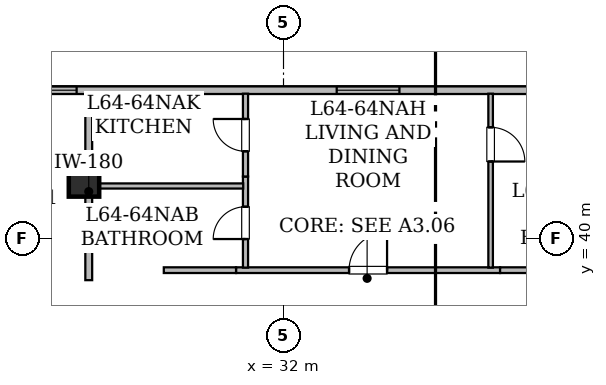
"""IFC4 building model, lengths in metres.
Left out: names, types, materials, properties, quantities, classifications, styles, units other than length and angle.
Written with IfcOpenShell. Run it as: python <this file> out.ifc"""

import sys

from ifc_helpers import new_model, si_unit, direction, frame, frame_2d, origin, origin_2d, place, context, subcontext, project, spatial, rectangle, hollow_rectangle, extrude, element, fill, save


model = new_model("IFC4")
c1 = context("Model", 3, precision=1e-05, world=origin(), true_north=direction((0.0, 1.0)))
c2 = subcontext(c1, "Body", "Model", "MODEL_VIEW")
j1 = project(units=[si_unit("LENGTHUNIT", "METRE"), si_unit("PLANEANGLEUNIT", "RADIAN")], contexts=[c1])
p1 = place(None, origin())
s1 = spatial("IfcSite", under=j1, at=p1, CompositionType="ELEMENT")
p2 = place(p1, origin())
s2 = spatial("IfcBuilding", under=s1, at=p2, CompositionType="ELEMENT")
p3 = place(p2, frame((0.0, 0.0, 250.05)))
s3 = spatial("IfcBuildingStorey", under=s2, at=p3, CompositionType="ELEMENT", Elevation=250.05)
p4 = place(p3, frame((26.75, 41.5, 0.0), z_axis=(0.0, 0.0, 1.0), x_axis=(1.0, 0.0, 0.0)))
e1 = element("IfcColumn", 1, at=p4, inside=s3, PredefinedType="COLUMN", context=c2, shape_type="SweptSolid", body=[
    extrude(hollow_rectangle(XDim=0.8, YDim=0.8, WallThickness=0.04, at=origin_2d()), origin(), (0.0, 0.0, 1.0), 3.65),
])
p5 = place(p3, frame((24.302, 43.9, 0.0), z_axis=(0.0, 0.0, 1.0), x_axis=(1.0, 0.0, 0.0)))
e2 = element("IfcWall", 2, at=p5, inside=s3, PredefinedType="STANDARD", context=c2, shape_type="SweptSolid", body=[
    extrude(rectangle(XDim=41.457, YDim=0.2, at=frame_2d((20.729, 0.0))), origin(), (0.0, 0.0, 1.0), 3.43),
])
p6 = place(p5, frame((0.604, 0.0, 0.85)))
e3 = element("IfcOpeningElement", 3, at=p6, cuts=e2, PredefinedType="OPENING", context=c2, shape_type="SweptSolid", body=[
    extrude(rectangle(XDim=1.65, YDim=1.55, at=frame_2d((0.825, 0.775))), frame((0.0, 0.11, 0.0), z_axis=(0.0, -1.0, 0.0), x_axis=(1.0, 0.0, 0.0)), (0.0, 0.0, 1.0), 0.22),
])
p7 = place(p5, frame((9.098, 0.0, 0.85)))
e4 = element("IfcOpeningElement", 4, at=p7, cuts=e2, PredefinedType="OPENING", context=c2, shape_type="SweptSolid", body=[
    extrude(rectangle(XDim=1.65, YDim=1.55, at=frame_2d((0.825, 0.775))), frame((0.0, 0.11, 0.0), z_axis=(0.0, -1.0, 0.0), x_axis=(1.0, 0.0, 0.0)), (0.0, 0.0, 1.0), 0.22),
])
p8 = place(p5, frame((14.405, 0.0, 0.85)))
e5 = element("IfcOpeningElement", 5, at=p8, cuts=e2, PredefinedType="OPENING", context=c2, shape_type="SweptSolid", body=[
    extrude(rectangle(XDim=1.65, YDim=1.55, at=frame_2d((0.825, 0.775))), frame((0.0, 0.11, 0.0), z_axis=(0.0, -1.0, 0.0), x_axis=(1.0, 0.0, 0.0)), (0.0, 0.0, 1.0), 0.22),
])
p9 = place(p5, frame((22.898, 0.0, 0.8)))
e6 = element("IfcOpeningElement", 6, at=p9, cuts=e2, PredefinedType="OPENING", context=c2, shape_type="SweptSolid", body=[
    extrude(rectangle(XDim=1.2, YDim=1.5, at=frame_2d((0.6, 0.75))), frame((0.0, 0.11, 0.0), z_axis=(0.0, -1.0, 0.0), x_axis=(1.0, 0.0, 0.0)), (0.0, 0.0, 1.0), 0.22),
])
p10 = place(p5, frame((19.188, 0.0, 0.85)))
e7 = element("IfcOpeningElement", 7, at=p10, cuts=e2, PredefinedType="OPENING", context=c2, shape_type="SweptSolid", body=[
    extrude(rectangle(XDim=1.65, YDim=1.55, at=frame_2d((0.825, 0.775))), frame((0.0, 0.11, 0.0), z_axis=(0.0, -1.0, 0.0), x_axis=(1.0, 0.0, 0.0)), (0.0, 0.0, 1.0), 0.22),
])
p11 = place(p5, frame((26.158, 0.0, 0.85)))
e8 = element("IfcOpeningElement", 8, at=p11, cuts=e2, PredefinedType="OPENING", context=c2, shape_type="SweptSolid", body=[
    extrude(rectangle(XDim=1.65, YDim=1.55, at=frame_2d((0.825, 0.775))), frame((0.0, 0.11, 0.0), z_axis=(0.0, -1.0, 0.0), x_axis=(1.0, 0.0, 0.0)), (0.0, 0.0, 1.0), 0.22),
])
p12 = place(p5, frame((32.408, 0.0, 0.85)))
e9 = element("IfcOpeningElement", 9, at=p12, cuts=e2, PredefinedType="OPENING", context=c2, shape_type="SweptSolid", body=[
    extrude(rectangle(XDim=1.65, YDim=1.55, at=frame_2d((0.825, 0.775))), frame((0.0, 0.11, 0.0), z_axis=(0.0, -1.0, 0.0), x_axis=(1.0, 0.0, 0.0)), (0.0, 0.0, 1.0), 0.22),
])
p13 = place(p3, frame((30.751, 39.165, 0.0), z_axis=(0.0, 0.0, 1.0), x_axis=(1.0, 0.0, 0.0)))
e10 = element("IfcWall", 10, at=p13, inside=s3, PredefinedType="STANDARD", context=c2, shape_type="SweptSolid", body=[
    extrude(rectangle(XDim=6.948, YDim=0.15, at=frame_2d((3.474, 0.0))), origin(), (0.0, 0.0, 1.0), 3.43),
])
p14 = place(p13, frame((2.974, 0.0, 0.0)))
e11 = element("IfcOpeningElement", 11, at=p14, cuts=e10, PredefinedType="OPENING", context=c2, shape_type="SweptSolid", body=[
    extrude(rectangle(XDim=1.0, YDim=2.15, at=frame_2d((0.5, 1.075))), frame((0.0, 0.085, 0.0), z_axis=(0.0, -1.0, 0.0), x_axis=(1.0, 0.0, 0.0)), (0.0, 0.0, 1.0), 0.17),
])
p15 = place(p3, frame((28.85, 39.165, 0.0), z_axis=(0.0, 0.0, 1.0), x_axis=(1.0, 0.0, 0.0)))
e12 = element("IfcWall", 12, at=p15, inside=s3, PredefinedType="STANDARD", context=c2, shape_type="SweptSolid", body=[
    extrude(rectangle(XDim=1.901, YDim=0.15, at=frame_2d((0.95, 0.0))), origin(), (0.0, 0.0, 1.0), 3.43),
])
p16 = place(p3, frame((37.699, 39.165, 0.0), z_axis=(0.0, 0.0, 1.0), x_axis=(1.0, 0.0, 0.0)))
e13 = element("IfcWall", 13, at=p16, inside=s3, PredefinedType="STANDARD", context=c2, shape_type="SweptSolid", body=[
    extrude(rectangle(XDim=3.851, YDim=0.15, at=frame_2d((1.926, 0.0))), origin(), (0.0, 0.0, 1.0), 2.725),
])
p17 = place(p3, frame((26.875, 41.643, 0.0), z_axis=(0.0, 0.0, 1.0), x_axis=(0.0, -1.0, 0.0)))
e14 = element("IfcWall", 14, at=p17, inside=s3, PredefinedType="STANDARD", context=c2, shape_type="SweptSolid", body=[
    extrude(rectangle(XDim=2.741, YDim=0.18, at=frame_2d((1.371, 0.0))), origin(), (0.0, 0.0, 1.0), 2.725),
])
p18 = place(p3, frame((26.875, 43.808, 0.0), z_axis=(0.0, 0.0, 1.0), x_axis=(0.0, -1.0, 0.0)))
e15 = element("IfcWall", 15, at=p18, inside=s3, PredefinedType="STANDARD", context=c2, shape_type="SweptSolid", body=[
    extrude(rectangle(XDim=2.165, YDim=0.18, at=frame_2d((1.083, 0.0))), origin(), (0.0, 0.0, 1.0), 2.725),
])
p19 = place(p3, frame((31.0, 39.232, 0.0), z_axis=(0.0, 0.0, 1.0), x_axis=(0.0, 1.0, 0.0)))
e16 = element("IfcWall", 16, at=p19, inside=s3, PredefinedType="PARTITIONING", context=c2, shape_type="SweptSolid", body=[
    extrude(rectangle(XDim=2.397, YDim=0.135, at=frame_2d((1.198, 0.0))), origin(), (0.0, 0.0, 1.0), 2.887),
])
p20 = place(p19, frame((0.752, 0.0, 0.0)))
e17 = element("IfcOpeningElement", 17, at=p20, cuts=e16, PredefinedType="OPENING", context=c2, shape_type="SweptSolid", body=[
    extrude(rectangle(XDim=0.85, YDim=2.1, at=frame_2d((0.425, 1.05))), frame((0.0, 0.077, 0.0), z_axis=(0.0, -1.0, 0.0), x_axis=(1.0, 0.0, 0.0)), (0.0, 0.0, 1.0), 0.155),
])
p21 = place(p3, frame((31.0, 41.629, 0.0), z_axis=(0.0, 0.0, 1.0), x_axis=(0.0, 1.0, 0.0)))
e18 = element("IfcWall", 18, at=p21, inside=s3, PredefinedType="PARTITIONING", context=c2, shape_type="SweptSolid", body=[
    extrude(rectangle(XDim=2.179, YDim=0.135, at=frame_2d((1.09, 0.0))), origin(), (0.0, 0.0, 1.0), 3.43),
])
p22 = place(p21, frame((0.664, 0.0, 0.0)))
e19 = element("IfcOpeningElement", 19, at=p22, cuts=e18, PredefinedType="OPENING", context=c2, shape_type="SweptSolid", body=[
    extrude(rectangle(XDim=0.85, YDim=2.1, at=frame_2d((0.425, 1.05))), frame((0.0, 0.077, 0.0), z_axis=(0.0, -1.0, 0.0), x_axis=(1.0, 0.0, 0.0)), (0.0, 0.0, 1.0), 0.155),
])
p23 = place(p3, frame((37.45, 43.808, 0.0), z_axis=(0.0, 0.0, 1.0), x_axis=(0.0, -1.0, 0.0)))
e20 = element("IfcWall", 20, at=p23, inside=s3, PredefinedType="PARTITIONING", context=c2, shape_type="SweptSolid", body=[
    extrude(rectangle(XDim=4.576, YDim=0.12, at=frame_2d((2.288, 0.0))), origin(), (0.0, 0.0, 1.0), 2.887),
])
p24 = place(p23, frame((0.884, 0.0, 0.0)))
e21 = element("IfcOpeningElement", 21, at=p24, cuts=e20, PredefinedType="OPENING", context=c2, shape_type="SweptSolid", body=[
    extrude(rectangle(XDim=0.9, YDim=2.1, at=frame_2d((0.45, 1.05))), frame((0.0, 0.07, 0.0), z_axis=(0.0, -1.0, 0.0), x_axis=(1.0, 0.0, 0.0)), (0.0, 0.0, 1.0), 0.14),
])
p25 = place(p3, frame((26.957, 41.38, 0.0), z_axis=(0.0, 0.0, 1.0), x_axis=(1.0, 0.0, 0.0)))
e22 = element("IfcWall", 22, at=p25, inside=s3, PredefinedType="PARTITIONING", context=c2, shape_type="SweptSolid", body=[
    extrude(rectangle(XDim=3.982, YDim=0.135, at=frame_2d((1.991, 0.0))), origin(), (0.0, 0.0, 1.0), 2.725),
])
p26 = place(p6, origin())
e23 = element("IfcWindow", 23, at=p26, inside=s3, PartitioningType="SINGLE_PANEL", PredefinedType="WINDOW", context=c2, shape_type="SweptSolid", body=[
    extrude(rectangle(XDim=1.65, YDim=1.55, at=frame_2d((0.825, 0.775))), frame((0.0, 0.03, 0.0), z_axis=(0.0, -1.0, 0.0), x_axis=(1.0, 0.0, 0.0)), (0.0, 0.0, 1.0), 0.06),
])
fill(e3, e23)
p27 = place(p7, origin())
e24 = element("IfcWindow", 24, at=p27, inside=s3, PartitioningType="SINGLE_PANEL", PredefinedType="WINDOW", context=c2, shape_type="SweptSolid", body=[
    extrude(rectangle(XDim=1.65, YDim=1.55, at=frame_2d((0.825, 0.775))), frame((0.0, 0.03, 0.0), z_axis=(0.0, -1.0, 0.0), x_axis=(1.0, 0.0, 0.0)), (0.0, 0.0, 1.0), 0.06),
])
fill(e4, e24)
p28 = place(p14, origin())
e25 = element("IfcDoor", 25, at=p28, inside=s3, OperationType="SINGLE_SWING_RIGHT", PredefinedType="DOOR", context=c2, shape_type="SweptSolid", body=[
    extrude(rectangle(XDim=1.0, YDim=2.15, at=frame_2d((0.5, 1.075))), frame((0.0, 0.025, 0.0), z_axis=(0.0, -1.0, 0.0), x_axis=(1.0, 0.0, 0.0)), (0.0, 0.0, 1.0), 0.05),
])
fill(e11, e25)
p29 = place(p20, origin())
e26 = element("IfcDoor", 26, at=p29, inside=s3, OperationType="SINGLE_SWING_LEFT", PredefinedType="DOOR", context=c2, shape_type="SweptSolid", body=[
    extrude(rectangle(XDim=0.85, YDim=2.1, at=frame_2d((0.425, 1.05))), frame((0.0, 0.025, 0.0), z_axis=(0.0, -1.0, 0.0), x_axis=(1.0, 0.0, 0.0)), (0.0, 0.0, 1.0), 0.05),
])
fill(e17, e26)
p30 = place(p22, origin())
e27 = element("IfcDoor", 27, at=p30, inside=s3, OperationType="SINGLE_SWING_RIGHT", PredefinedType="DOOR", context=c2, shape_type="SweptSolid", body=[
    extrude(rectangle(XDim=0.85, YDim=2.1, at=frame_2d((0.425, 1.05))), frame((0.0, 0.025, 0.0), z_axis=(0.0, -1.0, 0.0), x_axis=(1.0, 0.0, 0.0)), (0.0, 0.0, 1.0), 0.05),
])
fill(e19, e27)
p31 = place(p24, origin())
e28 = element("IfcDoor", 28, at=p31, inside=s3, OperationType="SINGLE_SWING_RIGHT", PredefinedType="DOOR", context=c2, shape_type="SweptSolid", body=[
    extrude(rectangle(XDim=0.9, YDim=2.1, at=frame_2d((0.45, 1.05))), frame((0.0, 0.025, 0.0), z_axis=(0.0, -1.0, 0.0), x_axis=(1.0, 0.0, 0.0)), (0.0, 0.0, 1.0), 0.05),
])
fill(e21, e28)
save(model, sys.argv[1])
